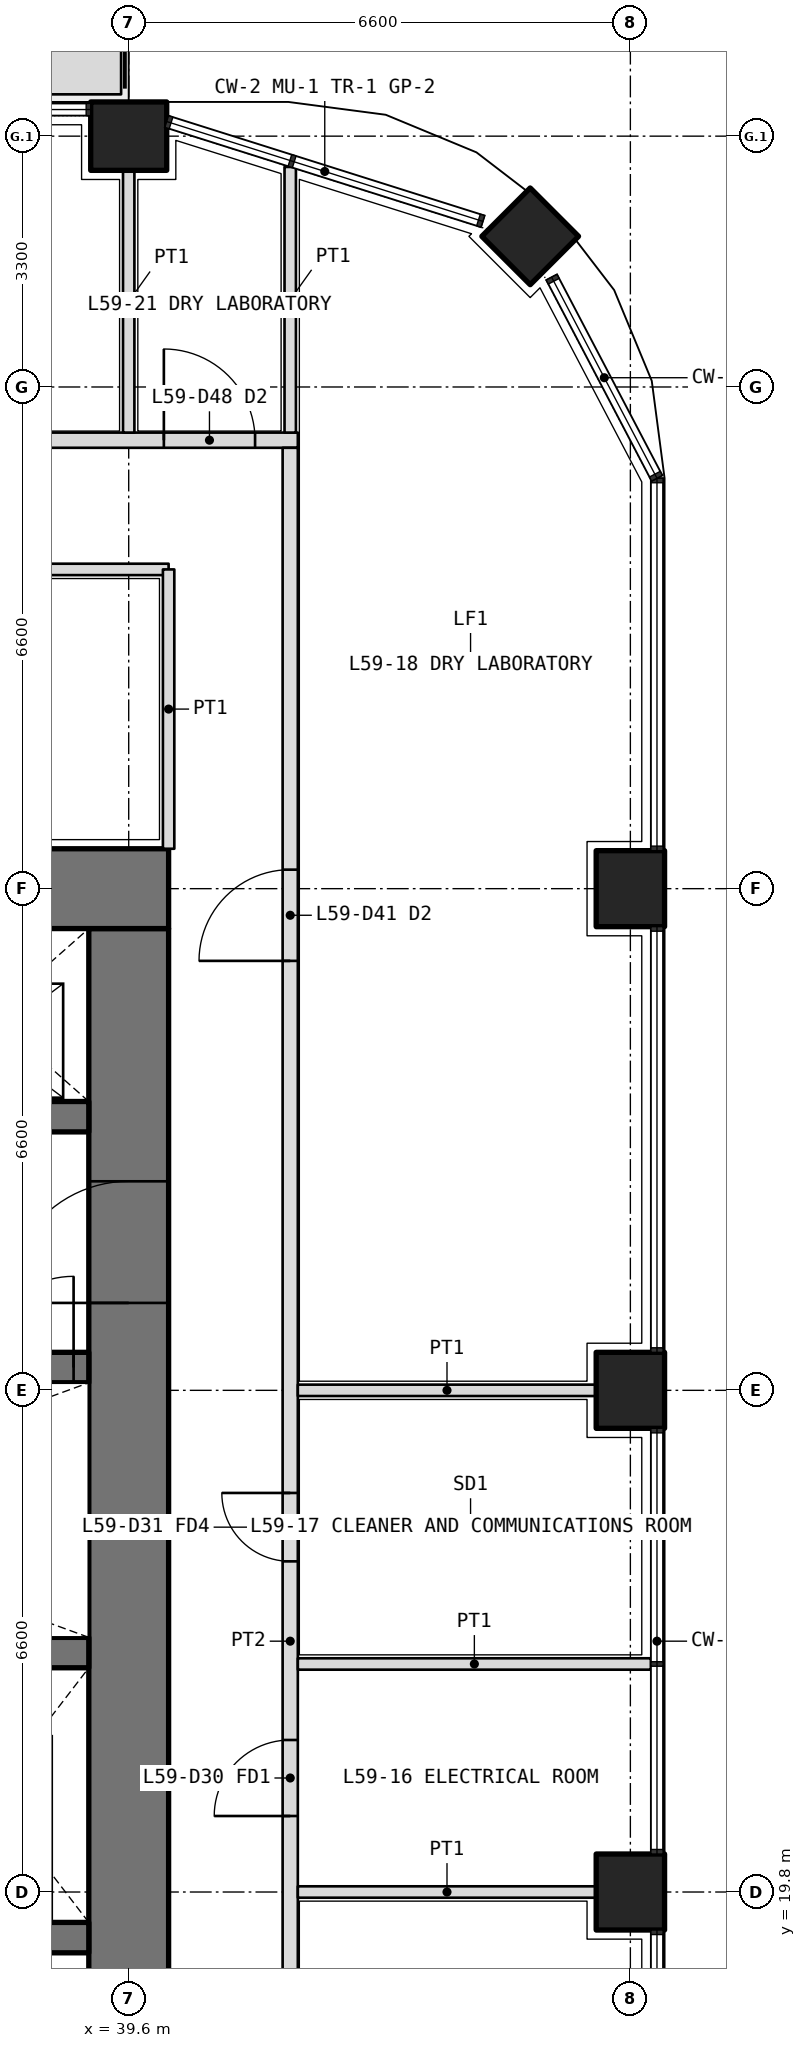
"""IFC4 building model, lengths in metres.
Left out: names, types, materials, properties, quantities, classifications, styles, units other than length and angle.
Written with IfcOpenShell. Run it as: python <this file> out.ifc"""

import sys

from ifc_helpers import new_model, si_unit, direction, frame, frame_2d, origin, origin_2d, place, context, subcontext, project, spatial, polyline, rectangle, outline, extrude, element, fill, save


model = new_model("IFC4")
c1 = context("Model", 3, precision=1e-05, world=origin(), true_north=direction((0.0, 1.0)))
c2 = subcontext(c1, "Body", "Model", "MODEL_VIEW")
j1 = project(units=[si_unit("LENGTHUNIT", "METRE"), si_unit("PLANEANGLEUNIT", "RADIAN")], contexts=[c1])
p1 = place(None, origin())
s1 = spatial("IfcSite", under=j1, at=p1, CompositionType="ELEMENT")
p2 = place(p1, origin())
s2 = spatial("IfcBuilding", under=s1, at=p2, CompositionType="ELEMENT")
p3 = place(p2, frame((0.0, 0.0, 258.6)))
s3 = spatial("IfcBuildingStorey", under=s2, at=p3, CompositionType="ELEMENT", Elevation=258.6)
p4 = place(p3, frame((44.882, 41.582, 0.0), z_axis=(0.0, 0.0, 1.0), x_axis=(0.707106781187, 0.707106781187, 0.0)))
e1 = element("IfcColumn", 1, at=p4, inside=s3, PredefinedType="COLUMN", context=c2, shape_type="SweptSolid", body=[
    extrude(rectangle(XDim=0.9, YDim=0.9, at=origin_2d()), origin(), (0.0, 0.0, 1.0), 4.2),
])
for number, where, z_axis, x_axis in (
    (2, (46.2, 19.8, 0.0), (0.0, 0.0, 1.0), (0.0, 1.0, 0.0)),
    (3, (46.2, 26.4, 0.0), (0.0, 0.0, 1.0), (0.0, 1.0, 0.0)),
    (4, (46.2, 33.0, 0.0), (0.0, 0.0, 1.0), (0.0, 1.0, 0.0)),
    (5, (39.6, 42.9, 0.0), (0.0, 0.0, 1.0), (1.0, 0.0, 0.0)),
):
    element("IfcColumn", number, at=place(p3, frame(where, z_axis=z_axis, x_axis=x_axis)), inside=s3, PredefinedType="COLUMN", context=c2, shape_type="SweptSolid", body=[
        extrude(rectangle(XDim=1.0, YDim=0.9, at=origin_2d()), origin(), (0.0, 0.0, 1.0), 4.2),
    ])
p5 = place(p3, origin())
e6 = element("IfcWall", 6, at=p5, inside=s3, PredefinedType="USERDEFINED", context=c2, shape_type="SweptSolid", body=[
    extrude(outline(polyline([(30.45, 43.45), (39.5, 43.45), (39.5, 44.45), (30.45, 44.45), (30.45, 43.45)]), holes=[polyline([(30.6, 43.6), (39.35, 43.6), (39.35, 44.3), (30.6, 44.3), (30.6, 43.6)])]), origin(), (0.0, 0.0, 1.0), 1.05),
])
p6 = place(p3, frame((39.6, 13.725, 0.0), z_axis=(0.0, 0.0, 1.0), x_axis=(0.0, 1.0, 0.0)))
e7 = element("IfcWall", 7, at=p6, inside=s3, PredefinedType="SHEAR", context=c2, shape_type="SweptSolid", body=[
    extrude(rectangle(XDim=18.75, YDim=1.05, at=frame_2d((9.375, 0.0))), origin(), (0.0, 0.0, 1.0), 4.2),
])
p7 = place(p6, frame((3.025, 0.0, 0.0)))
e8 = element("IfcOpeningElement", 8, at=p7, cuts=e7, PredefinedType="OPENING", context=c2, shape_type="SweptSolid", body=[
    extrude(rectangle(XDim=1.6, YDim=2.1, at=frame_2d((0.8, 1.05))), frame((0.0, 0.535, 0.0), z_axis=(0.0, -1.0, 0.0), x_axis=(1.0, 0.0, 0.0)), (0.0, 0.0, 1.0), 1.07),
])
p8 = place(p6, frame((13.825, 0.0, 0.0)))
e9 = element("IfcOpeningElement", 9, at=p8, cuts=e7, PredefinedType="OPENING", context=c2, shape_type="SweptSolid", body=[
    extrude(rectangle(XDim=1.6, YDim=2.1, at=frame_2d((0.8, 1.05))), frame((0.0, 0.535, 0.0), z_axis=(0.0, -1.0, 0.0), x_axis=(1.0, 0.0, 0.0)), (0.0, 0.0, 1.0), 1.07),
])
p9 = place(p3, frame((40.125, 33.0, 0.0), z_axis=(0.0, 0.0, 1.0), x_axis=(-1.0, 0.0, 0.0)))
e10 = element("IfcWall", 10, at=p9, inside=s3, PredefinedType="SHEAR", context=c2, shape_type="SweptSolid", body=[
    extrude(rectangle(XDim=27.45, YDim=1.05, at=frame_2d((13.725, 0.0))), origin(), (0.0, 0.0, 1.0), 4.2),
])
p10 = place(p3, frame((13.725, 19.2, 0.0), z_axis=(0.0, 0.0, 1.0), x_axis=(1.0, 0.0, 0.0)))
e11 = element("IfcWall", 11, at=p10, inside=s3, PredefinedType="SHEAR", context=c2, shape_type="SweptSolid", body=[
    extrude(rectangle(XDim=25.35, YDim=0.4, at=frame_2d((12.675, 0.0))), origin(), (0.0, 0.0, 1.0), 4.2),
])
p11 = place(p10, frame((10.575, 0.0, 0.0)))
e12 = element("IfcOpeningElement", 12, at=p11, cuts=e11, PredefinedType="OPENING", context=c2, shape_type="SweptSolid", body=[
    extrude(rectangle(XDim=0.9, YDim=2.1, at=frame_2d((0.45, 1.05))), frame((0.0, 0.21, 0.0), z_axis=(0.0, -1.0, 0.0), x_axis=(1.0, 0.0, 0.0)), (0.0, 0.0, 1.0), 0.42),
])
p12 = place(p10, frame((13.875, 0.0, 0.0)))
e13 = element("IfcOpeningElement", 13, at=p12, cuts=e11, PredefinedType="OPENING", context=c2, shape_type="SweptSolid", body=[
    extrude(rectangle(XDim=0.9, YDim=2.1, at=frame_2d((0.45, 1.05))), frame((0.0, 0.21, 0.0), z_axis=(0.0, -1.0, 0.0), x_axis=(1.0, 0.0, 0.0)), (0.0, 0.0, 1.0), 0.42),
])
p13 = place(p10, frame((0.2, 0.0, 0.0)))
e14 = element("IfcOpeningElement", 14, at=p13, cuts=e11, PredefinedType="OPENING", context=c2, shape_type="SweptSolid", body=[
    extrude(rectangle(XDim=1.2, YDim=2.1, at=frame_2d((0.6, 1.05))), frame((0.0, 0.21, 0.0), z_axis=(0.0, -1.0, 0.0), x_axis=(1.0, 0.0, 0.0)), (0.0, 0.0, 1.0), 0.42),
])
p14 = place(p10, frame((23.512, 0.0, 0.0)))
e15 = element("IfcOpeningElement", 15, at=p14, cuts=e11, PredefinedType="OPENING", context=c2, shape_type="SweptSolid", body=[
    extrude(rectangle(XDim=1.1, YDim=2.1, at=frame_2d((0.55, 1.05))), frame((0.0, 0.21, 0.0), z_axis=(0.0, -1.0, 0.0), x_axis=(1.0, 0.0, 0.0)), (0.0, 0.0, 1.0), 0.42),
])
p15 = place(p10, frame((17.125, 0.0, 0.0)))
e16 = element("IfcOpeningElement", 16, at=p15, cuts=e11, PredefinedType="OPENING", context=c2, shape_type="SweptSolid", body=[
    extrude(rectangle(XDim=1.1, YDim=2.1, at=frame_2d((0.55, 1.05))), frame((0.0, 0.21, 0.0), z_axis=(0.0, -1.0, 0.0), x_axis=(1.0, 0.0, 0.0)), (0.0, 0.0, 1.0), 0.42),
])
p16 = place(p10, frame((20.325, 0.0, 0.0)))
e17 = element("IfcOpeningElement", 17, at=p16, cuts=e11, PredefinedType="OPENING", context=c2, shape_type="SweptSolid", body=[
    extrude(rectangle(XDim=1.1, YDim=2.1, at=frame_2d((0.55, 1.05))), frame((0.0, 0.21, 0.0), z_axis=(0.0, -1.0, 0.0), x_axis=(1.0, 0.0, 0.0)), (0.0, 0.0, 1.0), 0.42),
])
p17 = place(p3, frame((13.725, 22.95, 0.0), z_axis=(0.0, 0.0, 1.0), x_axis=(1.0, 0.0, 0.0)))
e18 = element("IfcWall", 18, at=p17, inside=s3, PredefinedType="SHEAR", context=c2, shape_type="SweptSolid", body=[
    extrude(rectangle(XDim=25.35, YDim=0.4, at=frame_2d((12.675, 0.0))), origin(), (0.0, 0.0, 1.0), 4.2),
])
p18 = place(p3, frame((13.725, 26.7, 0.0), z_axis=(0.0, 0.0, 1.0), x_axis=(1.0, 0.0, 0.0)))
e19 = element("IfcWall", 19, at=p18, inside=s3, PredefinedType="SHEAR", context=c2, shape_type="SweptSolid", body=[
    extrude(rectangle(XDim=25.35, YDim=0.4, at=frame_2d((12.675, 0.0))), origin(), (0.0, 0.0, 1.0), 4.2),
])
p19 = place(p18, frame((23.95, 0.0, 0.0)))
e20 = element("IfcOpeningElement", 20, at=p19, cuts=e19, PredefinedType="OPENING", context=c2, shape_type="SweptSolid", body=[
    extrude(rectangle(XDim=1.2, YDim=2.1, at=frame_2d((0.6, 1.05))), frame((0.0, 0.21, 0.0), z_axis=(0.0, -1.0, 0.0), x_axis=(1.0, 0.0, 0.0)), (0.0, 0.0, 1.0), 0.42),
])
p20 = place(p18, frame((0.738, 0.0, 0.0)))
e21 = element("IfcOpeningElement", 21, at=p20, cuts=e19, PredefinedType="OPENING", context=c2, shape_type="SweptSolid", body=[
    extrude(rectangle(XDim=1.1, YDim=2.1, at=frame_2d((0.55, 1.05))), frame((0.0, 0.21, 0.0), z_axis=(0.0, -1.0, 0.0), x_axis=(1.0, 0.0, 0.0)), (0.0, 0.0, 1.0), 0.42),
])
p21 = place(p18, frame((3.925, 0.0, 0.0)))
e22 = element("IfcOpeningElement", 22, at=p21, cuts=e19, PredefinedType="OPENING", context=c2, shape_type="SweptSolid", body=[
    extrude(rectangle(XDim=1.1, YDim=2.1, at=frame_2d((0.55, 1.05))), frame((0.0, 0.21, 0.0), z_axis=(0.0, -1.0, 0.0), x_axis=(1.0, 0.0, 0.0)), (0.0, 0.0, 1.0), 0.42),
])
p22 = place(p18, frame((7.175, 0.0, 0.0)))
e23 = element("IfcOpeningElement", 23, at=p22, cuts=e19, PredefinedType="OPENING", context=c2, shape_type="SweptSolid", body=[
    extrude(rectangle(XDim=1.1, YDim=2.1, at=frame_2d((0.55, 1.05))), frame((0.0, 0.21, 0.0), z_axis=(0.0, -1.0, 0.0), x_axis=(1.0, 0.0, 0.0)), (0.0, 0.0, 1.0), 0.42),
])
p23 = place(p18, frame((10.425, 0.0, 0.0)))
e24 = element("IfcOpeningElement", 24, at=p23, cuts=e19, PredefinedType="OPENING", context=c2, shape_type="SweptSolid", body=[
    extrude(rectangle(XDim=1.1, YDim=2.1, at=frame_2d((0.55, 1.05))), frame((0.0, 0.21, 0.0), z_axis=(0.0, -1.0, 0.0), x_axis=(1.0, 0.0, 0.0)), (0.0, 0.0, 1.0), 0.42),
])
p24 = place(p18, frame((13.775, 0.0, 0.0)))
e25 = element("IfcOpeningElement", 25, at=p24, cuts=e19, PredefinedType="OPENING", context=c2, shape_type="SweptSolid", body=[
    extrude(rectangle(XDim=1.1, YDim=2.1, at=frame_2d((0.55, 1.05))), frame((0.0, 0.21, 0.0), z_axis=(0.0, -1.0, 0.0), x_axis=(1.0, 0.0, 0.0)), (0.0, 0.0, 1.0), 0.42),
])
p25 = place(p3, frame((13.725, 30.0, 0.0), z_axis=(0.0, 0.0, 1.0), x_axis=(1.0, 0.0, 0.0)))
e26 = element("IfcWall", 26, at=p25, inside=s3, PredefinedType="SHEAR", context=c2, shape_type="SweptSolid", body=[
    extrude(rectangle(XDim=25.35, YDim=0.4, at=frame_2d((12.675, 0.0))), origin(), (0.0, 0.0, 1.0), 4.2),
])
p26 = place(p25, frame((0.837, 0.0, 0.0)))
e27 = element("IfcOpeningElement", 27, at=p26, cuts=e26, PredefinedType="OPENING", context=c2, shape_type="SweptSolid", body=[
    extrude(rectangle(XDim=1.0, YDim=2.1, at=frame_2d((0.5, 1.05))), frame((0.0, 0.21, 0.0), z_axis=(0.0, -1.0, 0.0), x_axis=(1.0, 0.0, 0.0)), (0.0, 0.0, 1.0), 0.42),
])
p27 = place(p25, frame((3.925, 0.0, 0.0)))
e28 = element("IfcOpeningElement", 28, at=p27, cuts=e26, PredefinedType="OPENING", context=c2, shape_type="SweptSolid", body=[
    extrude(rectangle(XDim=1.0, YDim=2.1, at=frame_2d((0.5, 1.05))), frame((0.0, 0.21, 0.0), z_axis=(0.0, -1.0, 0.0), x_axis=(1.0, 0.0, 0.0)), (0.0, 0.0, 1.0), 0.42),
])
p28 = place(p25, frame((7.225, 0.0, 0.0)))
e29 = element("IfcOpeningElement", 29, at=p28, cuts=e26, PredefinedType="OPENING", context=c2, shape_type="SweptSolid", body=[
    extrude(rectangle(XDim=1.0, YDim=2.1, at=frame_2d((0.5, 1.05))), frame((0.0, 0.21, 0.0), z_axis=(0.0, -1.0, 0.0), x_axis=(1.0, 0.0, 0.0)), (0.0, 0.0, 1.0), 0.42),
])
p29 = place(p25, frame((10.525, 0.0, 0.0)))
e30 = element("IfcOpeningElement", 30, at=p29, cuts=e26, PredefinedType="OPENING", context=c2, shape_type="SweptSolid", body=[
    extrude(rectangle(XDim=1.0, YDim=2.1, at=frame_2d((0.5, 1.05))), frame((0.0, 0.21, 0.0), z_axis=(0.0, -1.0, 0.0), x_axis=(1.0, 0.0, 0.0)), (0.0, 0.0, 1.0), 0.42),
])
p30 = place(p25, frame((13.775, 0.0, 0.0)))
e31 = element("IfcOpeningElement", 31, at=p30, cuts=e26, PredefinedType="OPENING", context=c2, shape_type="SweptSolid", body=[
    extrude(rectangle(XDim=1.1, YDim=2.1, at=frame_2d((0.55, 1.05))), frame((0.0, 0.21, 0.0), z_axis=(0.0, -1.0, 0.0), x_axis=(1.0, 0.0, 0.0)), (0.0, 0.0, 1.0), 0.42),
])
p31 = place(p25, frame((17.075, 0.0, 0.0)))
e32 = element("IfcOpeningElement", 32, at=p31, cuts=e26, PredefinedType="OPENING", context=c2, shape_type="SweptSolid", body=[
    extrude(rectangle(XDim=1.1, YDim=2.1, at=frame_2d((0.55, 1.05))), frame((0.0, 0.21, 0.0), z_axis=(0.0, -1.0, 0.0), x_axis=(1.0, 0.0, 0.0)), (0.0, 0.0, 1.0), 0.42),
])
p32 = place(p25, frame((20.375, 0.0, 0.0)))
e33 = element("IfcOpeningElement", 33, at=p32, cuts=e26, PredefinedType="OPENING", context=c2, shape_type="SweptSolid", body=[
    extrude(rectangle(XDim=1.1, YDim=2.1, at=frame_2d((0.55, 1.05))), frame((0.0, 0.21, 0.0), z_axis=(0.0, -1.0, 0.0), x_axis=(1.0, 0.0, 0.0)), (0.0, 0.0, 1.0), 0.42),
])
p33 = place(p25, frame((23.462, 0.0, 0.0)))
e34 = element("IfcOpeningElement", 34, at=p33, cuts=e26, PredefinedType="OPENING", context=c2, shape_type="SweptSolid", body=[
    extrude(rectangle(XDim=1.1, YDim=2.1, at=frame_2d((0.55, 1.05))), frame((0.0, 0.21, 0.0), z_axis=(0.0, -1.0, 0.0), x_axis=(1.0, 0.0, 0.0)), (0.0, 0.0, 1.0), 0.42),
])
p34 = place(p3, frame((12.675, 37.2, 0.0), z_axis=(0.0, 0.0, 1.0), x_axis=(1.0, 0.0, 0.0)))
e35 = element("IfcWall", 35, at=p34, inside=s3, PredefinedType="PARTITIONING", context=c2, shape_type="SweptSolid", body=[
    extrude(rectangle(XDim=27.45, YDim=0.15, at=frame_2d((13.725, 0.0))), origin(), (0.0, 0.0, 1.0), 3.0),
])
p35 = place(p34, frame((1.413, 0.0, 0.0)))
e36 = element("IfcOpeningElement", 36, at=p35, cuts=e35, PredefinedType="OPENING", context=c2, shape_type="SweptSolid", body=[
    extrude(rectangle(XDim=1.0, YDim=2.1, at=frame_2d((0.5, 1.05))), frame((0.0, 0.085, 0.0), z_axis=(0.0, -1.0, 0.0), x_axis=(1.0, 0.0, 0.0)), (0.0, 0.0, 1.0), 0.17),
])
p36 = place(p34, frame((6.625, 0.0, 0.0)))
e37 = element("IfcOpeningElement", 37, at=p36, cuts=e35, PredefinedType="OPENING", context=c2, shape_type="SweptSolid", body=[
    extrude(rectangle(XDim=1.0, YDim=2.1, at=frame_2d((0.5, 1.05))), frame((0.0, 0.085, 0.0), z_axis=(0.0, -1.0, 0.0), x_axis=(1.0, 0.0, 0.0)), (0.0, 0.0, 1.0), 0.17),
])
p37 = place(p34, frame((14.875, 0.0, 0.0)))
e38 = element("IfcOpeningElement", 38, at=p37, cuts=e35, PredefinedType="OPENING", context=c2, shape_type="SweptSolid", body=[
    extrude(rectangle(XDim=1.0, YDim=2.1, at=frame_2d((0.5, 1.05))), frame((0.0, 0.085, 0.0), z_axis=(0.0, -1.0, 0.0), x_axis=(1.0, 0.0, 0.0)), (0.0, 0.0, 1.0), 0.17),
])
p38 = place(p34, frame((23.387, 0.0, 0.0)))
e39 = element("IfcOpeningElement", 39, at=p38, cuts=e35, PredefinedType="OPENING", context=c2, shape_type="SweptSolid", body=[
    extrude(rectangle(XDim=1.0, YDim=2.1, at=frame_2d((0.5, 1.05))), frame((0.0, 0.085, 0.0), z_axis=(0.0, -1.0, 0.0), x_axis=(1.0, 0.0, 0.0)), (0.0, 0.0, 1.0), 0.17),
])
p39 = place(p3, frame((40.125, 33.525, 0.0), z_axis=(0.0, 0.0, 1.0), x_axis=(0.0, 1.0, 0.0)))
e40 = element("IfcWall", 40, at=p39, inside=s3, PredefinedType="PARTITIONING", context=c2, shape_type="SweptSolid", body=[
    extrude(rectangle(XDim=3.675, YDim=0.15, at=frame_2d((1.837, 0.0))), origin(), (0.0, 0.0, 1.0), 3.0),
])
p40 = place(p3, frame((10.975, 38.9, 0.0), z_axis=(0.0, 0.0, 1.0), x_axis=(1.0, 0.0, 0.0)))
e41 = element("IfcWall", 41, at=p40, inside=s3, PredefinedType="PARTITIONING", context=c2, shape_type="SweptSolid", body=[
    extrude(rectangle(XDim=30.85, YDim=0.2, at=frame_2d((15.425, 0.0))), origin(), (0.0, 0.0, 1.0), 3.0),
])
p41 = place(p40, frame((7.262, 0.0, 0.0)))
e42 = element("IfcOpeningElement", 42, at=p41, cuts=e41, PredefinedType="OPENING", context=c2, shape_type="SweptSolid", body=[
    extrude(rectangle(XDim=1.0, YDim=2.1, at=frame_2d((0.5, 1.05))), frame((0.0, 0.11, 0.0), z_axis=(0.0, -1.0, 0.0), x_axis=(1.0, 0.0, 0.0)), (0.0, 0.0, 1.0), 0.22),
])
p42 = place(p40, frame((21.525, 0.0, 0.0)))
e43 = element("IfcOpeningElement", 43, at=p42, cuts=e41, PredefinedType="OPENING", context=c2, shape_type="SweptSolid", body=[
    extrude(rectangle(XDim=1.0, YDim=2.1, at=frame_2d((0.5, 1.05))), frame((0.0, 0.11, 0.0), z_axis=(0.0, -1.0, 0.0), x_axis=(1.0, 0.0, 0.0)), (0.0, 0.0, 1.0), 0.22),
])
p43 = place(p40, frame((29.087, 0.0, 0.0)))
e44 = element("IfcOpeningElement", 44, at=p43, cuts=e41, PredefinedType="OPENING", context=c2, shape_type="SweptSolid", body=[
    extrude(rectangle(XDim=1.2, YDim=2.1, at=frame_2d((0.6, 1.05))), frame((0.0, 0.11, 0.0), z_axis=(0.0, -1.0, 0.0), x_axis=(1.0, 0.0, 0.0)), (0.0, 0.0, 1.0), 0.22),
])
p44 = place(p3, frame((41.725, 7.4, 0.0), z_axis=(0.0, 0.0, 1.0), x_axis=(0.0, 1.0, 0.0)))
e45 = element("IfcWall", 45, at=p44, inside=s3, PredefinedType="PARTITIONING", context=c2, shape_type="SweptSolid", body=[
    extrude(rectangle(XDim=31.4, YDim=0.2, at=frame_2d((15.7, 0.0))), origin(), (0.0, 0.0, 1.0), 3.0),
])
p45 = place(p44, frame((5.65, 0.0, 0.0)))
e46 = element("IfcOpeningElement", 46, at=p45, cuts=e45, PredefinedType="OPENING", context=c2, shape_type="SweptSolid", body=[
    extrude(rectangle(XDim=1.0, YDim=2.1, at=frame_2d((0.5, 1.05))), frame((0.0, 0.11, 0.0), z_axis=(0.0, -1.0, 0.0), x_axis=(1.0, 0.0, 0.0)), (0.0, 0.0, 1.0), 0.22),
])
p46 = place(p44, frame((13.4, 0.0, 0.0)))
e47 = element("IfcOpeningElement", 47, at=p46, cuts=e45, PredefinedType="OPENING", context=c2, shape_type="SweptSolid", body=[
    extrude(rectangle(XDim=1.0, YDim=2.1, at=frame_2d((0.5, 1.05))), frame((0.0, 0.11, 0.0), z_axis=(0.0, -1.0, 0.0), x_axis=(1.0, 0.0, 0.0)), (0.0, 0.0, 1.0), 0.22),
])
p47 = place(p44, frame((16.75, 0.0, 0.0)))
e48 = element("IfcOpeningElement", 48, at=p47, cuts=e45, PredefinedType="OPENING", context=c2, shape_type="SweptSolid", body=[
    extrude(rectangle(XDim=0.9, YDim=2.1, at=frame_2d((0.45, 1.05))), frame((0.0, 0.11, 0.0), z_axis=(0.0, -1.0, 0.0), x_axis=(1.0, 0.0, 0.0)), (0.0, 0.0, 1.0), 0.22),
])
p48 = place(p44, frame((24.65, 0.0, 0.0)))
e49 = element("IfcOpeningElement", 49, at=p48, cuts=e45, PredefinedType="OPENING", context=c2, shape_type="SweptSolid", body=[
    extrude(rectangle(XDim=1.2, YDim=2.1, at=frame_2d((0.6, 1.05))), frame((0.0, 0.11, 0.0), z_axis=(0.0, -1.0, 0.0), x_axis=(1.0, 0.0, 0.0)), (0.0, 0.0, 1.0), 0.22),
])
p49 = place(p3, frame((41.725, 42.495, 0.0), z_axis=(0.0, 0.0, 1.0), x_axis=(0.0, -1.0, 0.0)))
e50 = element("IfcWall", 50, at=p49, inside=s3, PredefinedType="PARTITIONING", context=c2, shape_type="SweptSolid", body=[
    extrude(rectangle(XDim=3.495, YDim=0.15, at=frame_2d((1.748, 0.0))), origin(), (0.0, 0.0, 1.0), 2.7),
])
p50 = place(p3, frame((46.47, 22.8, 0.0), z_axis=(0.0, 0.0, 1.0), x_axis=(-1.0, 0.0, 0.0)))
e51 = element("IfcWall", 51, at=p50, inside=s3, PredefinedType="PARTITIONING", context=c2, shape_type="SweptSolid", body=[
    extrude(rectangle(XDim=4.645, YDim=0.15, at=frame_2d((2.323, 0.0))), origin(), (0.0, 0.0, 1.0), 2.7),
])
for number, where, z_axis, x_axis in (
    (52, (45.75, 26.4, 0.0), (0.0, 0.0, 1.0), (-1.0, 0.0, 0.0)),
    (53, (45.75, 19.8, 0.0), (0.0, 0.0, 1.0), (-1.0, 0.0, 0.0)),
):
    element("IfcWall", number, at=place(p3, frame(where, z_axis=z_axis, x_axis=x_axis)), inside=s3, PredefinedType="PARTITIONING", context=c2, shape_type="SweptSolid", body=[
        extrude(rectangle(XDim=3.925, YDim=0.15, at=frame_2d((1.962, 0.0))), origin(), (0.0, 0.0, 1.0), 3.0),
    ])
p51 = place(p3, frame((39.6, 42.45, 0.0), z_axis=(0.0, 0.0, 1.0), x_axis=(0.0, -1.0, 0.0)))
e54 = element("IfcWall", 54, at=p51, inside=s3, PredefinedType="PARTITIONING", context=c2, shape_type="SweptSolid", body=[
    extrude(rectangle(XDim=3.45, YDim=0.15, at=frame_2d((1.725, 0.0))), origin(), (0.0, 0.0, 1.0), 3.0),
])
p52 = place(p46, origin())
e55 = element("IfcDoor", 55, at=p52, inside=s3, OperationType="SINGLE_SWING_LEFT", PredefinedType="DOOR", context=c2, shape_type="SweptSolid", body=[
    extrude(rectangle(XDim=1.0, YDim=2.1, at=frame_2d((0.5, 1.05))), frame((0.0, 0.025, 0.0), z_axis=(0.0, -1.0, 0.0), x_axis=(1.0, 0.0, 0.0)), (0.0, 0.0, 1.0), 0.05),
])
fill(e47, e55)
p53 = place(p47, origin())
e56 = element("IfcDoor", 56, at=p53, inside=s3, OperationType="SINGLE_SWING_RIGHT", PredefinedType="DOOR", context=c2, shape_type="SweptSolid", body=[
    extrude(rectangle(XDim=0.9, YDim=2.1, at=frame_2d((0.45, 1.05))), frame((0.0, 0.025, 0.0), z_axis=(0.0, -1.0, 0.0), x_axis=(1.0, 0.0, 0.0)), (0.0, 0.0, 1.0), 0.05),
])
fill(e48, e56)
p54 = place(p48, origin())
e57 = element("IfcDoor", 57, at=p54, inside=s3, OperationType="DOUBLE_DOOR_SINGLE_SWING", PredefinedType="DOOR", context=c2, shape_type="SweptSolid", body=[
    extrude(rectangle(XDim=1.2, YDim=2.1, at=frame_2d((0.6, 1.05))), frame((0.0, 0.025, 0.0), z_axis=(0.0, -1.0, 0.0), x_axis=(1.0, 0.0, 0.0)), (0.0, 0.0, 1.0), 0.05),
])
fill(e49, e57)
p55 = place(p43, origin())
e58 = element("IfcDoor", 58, at=p55, inside=s3, OperationType="DOUBLE_DOOR_SINGLE_SWING", PredefinedType="DOOR", context=c2, shape_type="SweptSolid", body=[
    extrude(rectangle(XDim=1.2, YDim=2.1, at=frame_2d((0.6, 1.05))), frame((0.0, 0.025, 0.0), z_axis=(0.0, -1.0, 0.0), x_axis=(1.0, 0.0, 0.0)), (0.0, 0.0, 1.0), 0.05),
])
fill(e44, e58)
p56 = place(p19, origin())
e59 = element("IfcDoor", 59, at=p56, inside=s3, OperationType="SINGLE_SWING_RIGHT", PredefinedType="DOOR", context=c2, shape_type="SweptSolid", body=[
    extrude(rectangle(XDim=1.2, YDim=2.1, at=frame_2d((0.6, 1.05))), frame((0.0, 0.025, 0.0), z_axis=(0.0, -1.0, 0.0), x_axis=(1.0, 0.0, 0.0)), (0.0, 0.0, 1.0), 0.05),
])
fill(e20, e59)
p57 = place(p8, origin())
e60 = element("IfcDoor", 60, at=p57, inside=s3, OperationType="DOUBLE_DOOR_DOUBLE_SWING", PredefinedType="DOOR", context=c2, shape_type="SweptSolid", body=[
    extrude(rectangle(XDim=1.6, YDim=2.1, at=frame_2d((0.8, 1.05))), frame((0.0, 0.025, 0.0), z_axis=(0.0, -1.0, 0.0), x_axis=(1.0, 0.0, 0.0)), (0.0, 0.0, 1.0), 0.05),
])
fill(e9, e60)
save(model, sys.argv[1])
